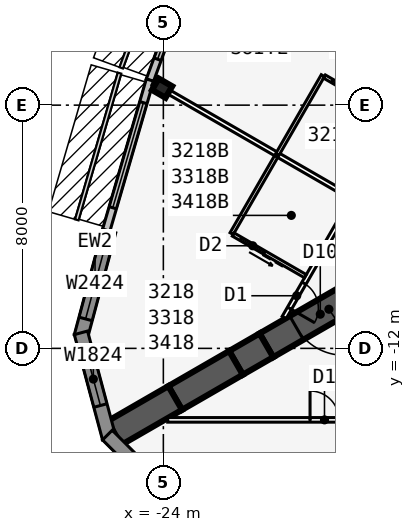
"""IFC4 building model, lengths in metres.
Left out: names, types, materials, properties, quantities, classifications, styles, units other than length and angle.
Written with IfcOpenShell. Run it as: python <this file> out.ifc"""

import sys

from ifc_helpers import new_model, si_unit, direction, frame, frame_2d, origin, origin_2d, place, context, subcontext, project, spatial, polyline, rectangle, i_section, outline, extrude, element, fill, save


model = new_model("IFC4")
c1 = context("Model", 3, precision=1e-05, world=origin(), true_north=direction((0.0, 1.0)))
c2 = subcontext(c1, "Body", "Model", "MODEL_VIEW")
j1 = project(units=[si_unit("LENGTHUNIT", "METRE"), si_unit("PLANEANGLEUNIT", "RADIAN")], contexts=[c1])
p1 = place(None, origin())
s1 = spatial("IfcSite", under=j1, at=p1, CompositionType="ELEMENT")
p2 = place(p1, origin())
s2 = spatial("IfcBuilding", under=s1, at=p2, CompositionType="ELEMENT")
p3 = place(p2, frame((0.0, 0.0, 124.9)))
s3 = spatial("IfcBuildingStorey", under=s2, at=p3, CompositionType="ELEMENT", Elevation=124.9)
p4 = place(p3, frame((-16.5, -9.526, 0.0), z_axis=(0.0, 0.0, 1.0), x_axis=(-0.866031398331, -0.499989616998, 0.0)))
e1 = element("IfcWall", 1, at=p4, inside=s3, PredefinedType="SHEAR", context=c2, shape_type="SweptSolid", body=[
    extrude(rectangle(XDim=4.746, YDim=0.9, at=frame_2d((2.373, 0.0))), origin(), (0.0, 0.0, 1.0), 3.4),
])
p5 = place(p4, frame((1.8, 0.0, 0.0)))
e2 = element("IfcOpeningElement", 2, at=p5, cuts=e1, PredefinedType="OPENING", context=c2, shape_type="SweptSolid", body=[
    extrude(rectangle(XDim=1.8, YDim=2.13, at=frame_2d((0.9, 1.065))), frame((0.0, 0.46, 0.0), z_axis=(0.0, -1.0, 0.0), x_axis=(1.0, 0.0, 0.0)), (0.0, 0.0, 1.0), 0.92),
])
p6 = place(p3, frame((-20.61, -11.899, 0.0), z_axis=(0.0, 0.0, 1.0), x_axis=(-0.866009537788, -0.500027479704, 0.0)))
e3 = element("IfcWall", 3, at=p6, inside=s3, PredefinedType="SHEAR", context=c2, shape_type="SweptSolid", body=[
    extrude(rectangle(XDim=1.155, YDim=0.9, at=frame_2d((0.577, 0.0))), origin(), (0.0, 0.0, 1.0), 3.4),
])
for number, where, z_axis, x_axis in (
    (4, (-21.61, -12.477, 0.0), (0.0, 0.0, 1.0), (-0.866, -0.5, 0.0)),
    (5, (-23.61, -13.631, 0.0), (0.0, 0.0, 1.0), (-0.866, -0.5, 0.0)),
):
    element("IfcWall", number, at=place(p3, frame(where, z_axis=z_axis, x_axis=x_axis)), inside=s3, PredefinedType="SHEAR", context=c2, shape_type="SweptSolid", body=[
        extrude(rectangle(XDim=2.309, YDim=0.9, at=frame_2d((1.155, 0.0))), origin(), (0.0, 0.0, 1.0), 3.4),
    ])
p7 = place(p3, frame((-24.041, -3.44, 0.0), z_axis=(0.0, 0.0, 1.0), x_axis=(-0.5, -0.866025403784, 0.0)))
e6 = element("IfcColumn", 6, at=p7, inside=s3, PredefinedType="COLUMN", context=c2, shape_type="SweptSolid", body=[
    extrude(i_section(OverallWidth=0.437, OverallDepth=0.513, WebThickness=0.061, FlangeThickness=0.097, at=origin_2d()), origin(), (0.0, 0.0, 1.0), 3.4),
])
p8 = place(p3, frame((-22.701, 1.584, 0.0), z_axis=(0.0, 0.0, 1.0), x_axis=(-0.343225593282, -0.939252996863, 0.0)))
e7 = element("IfcWall", 7, at=p8, inside=s3, PredefinedType="STANDARD", context=c2, shape_type="SweptSolid", body=[
    extrude(rectangle(XDim=5.076, YDim=0.25, at=frame_2d((2.538, 0.0))), origin(), (0.0, 0.0, 1.0), 3.235),
])
p9 = place(p8, frame((0.738, 0.0, 0.45)))
e8 = element("IfcOpeningElement", 8, at=p9, cuts=e7, PredefinedType="OPENING", context=c2, shape_type="SweptSolid", body=[
    extrude(rectangle(XDim=3.6, YDim=2.4, at=frame_2d((1.8, 1.2))), frame((0.0, 0.135, 0.0), z_axis=(0.0, -1.0, 0.0), x_axis=(1.0, 0.0, 0.0)), (0.0, 0.0, 1.0), 0.27),
])
p10 = place(p3, frame((-24.441, -3.175, 0.0), z_axis=(0.0, 0.0, 1.0), x_axis=(-0.279528287117, -0.960137457191, 0.0)))
e9 = element("IfcWall", 9, at=p10, inside=s3, PredefinedType="STANDARD", context=c2, shape_type="SweptSolid", body=[
    extrude(rectangle(XDim=5.148, YDim=0.25, at=frame_2d((2.574, 0.0))), origin(), (0.0, 0.0, 1.0), 3.235),
])
p11 = place(p10, frame((0.774, 0.0, 0.45)))
e10 = element("IfcOpeningElement", 10, at=p11, cuts=e9, PredefinedType="OPENING", context=c2, shape_type="SweptSolid", body=[
    extrude(rectangle(XDim=3.6, YDim=2.4, at=frame_2d((1.8, 1.2))), frame((0.0, 0.135, 0.0), z_axis=(0.0, -1.0, 0.0), x_axis=(1.0, 0.0, 0.0)), (0.0, 0.0, 1.0), 0.27),
])
p12 = place(p3, frame((-25.783, -8.141, 0.0), z_axis=(0.0, 0.0, 1.0), x_axis=(-0.258823421857, -0.965924653531, 0.0)))
e11 = element("IfcWall", 11, at=p12, inside=s3, PredefinedType="SOLIDWALL", context=c2, shape_type="SweptSolid", body=[
    extrude(rectangle(XDim=3.586, YDim=0.45, at=frame_2d((1.793, 0.0))), origin(), (0.0, 0.0, 1.0), 3.235),
])
p13 = place(p12, frame((0.593, 0.0, 0.45)))
e12 = element("IfcOpeningElement", 12, at=p13, cuts=e11, PredefinedType="OPENING", context=c2, shape_type="SweptSolid", body=[
    extrude(rectangle(XDim=2.4, YDim=2.4, at=frame_2d((1.2, 1.2))), frame((0.0, 0.235, 0.0), z_axis=(0.0, -1.0, 0.0), x_axis=(1.0, 0.0, 0.0)), (0.0, 0.0, 1.0), 0.47),
])
p14 = place(p3, frame((-26.711, -11.489, 0.0), z_axis=(0.0, 0.0, 1.0), x_axis=(0.258823421857, -0.965924653531, 0.0)))
e13 = element("IfcWall", 13, at=p14, inside=s3, PredefinedType="SOLIDWALL", context=c2, shape_type="SweptSolid", body=[
    extrude(outline(polyline([(3.586, 0.225), (3.527, 0.225), (3.035, 0.093), (3.0, 0.225), (0.0, 0.225), (0.0, -0.225), (3.586, -0.225), (3.586, 0.225)])), origin(), (0.0, 0.0, 1.0), 3.235),
])
p15 = place(p14, frame((0.675, 0.0, 0.45)))
e14 = element("IfcOpeningElement", 14, at=p15, cuts=e13, PredefinedType="OPENING", context=c2, shape_type="SweptSolid", body=[
    extrude(rectangle(XDim=1.8, YDim=2.4, at=frame_2d((0.9, 1.2))), frame((0.0, 0.235, 0.0), z_axis=(0.0, -1.0, 0.0), x_axis=(1.0, 0.0, 0.0)), (0.0, 0.0, 1.0), 0.47),
])
p16 = place(p3, frame((-25.841, -14.852, 0.0), z_axis=(0.0, 0.0, 1.0), x_axis=(0.707106781187, -0.707106781187, 0.0)))
e15 = element("IfcWall", 15, at=p16, inside=s3, PredefinedType="SOLIDWALL", context=c2, shape_type="SweptSolid", body=[
    extrude(outline(polyline([(3.586, 0.225), (0.586, 0.225), (0.551, 0.093), (0.059, 0.225), (0.0, 0.225), (0.0, -0.225), (3.586, -0.225), (3.586, 0.225)])), origin(), (0.0, 0.0, 1.0), 3.235),
])
p17 = place(p16, frame((1.111, 0.0, 0.45)))
e16 = element("IfcOpeningElement", 16, at=p17, cuts=e15, PredefinedType="OPENING", context=c2, shape_type="SweptSolid", body=[
    extrude(rectangle(XDim=1.8, YDim=2.4, at=frame_2d((0.9, 1.2))), frame((0.0, 0.235, 0.0), z_axis=(0.0, -1.0, 0.0), x_axis=(1.0, 0.0, 0.0)), (0.0, 0.0, 1.0), 0.47),
])
p18 = place(p3, frame((-23.857, -14.351, 0.0), z_axis=(0.0, 0.0, 1.0), x_axis=(1.0, 0.0, 0.0)))
e17 = element("IfcWall", 17, at=p18, inside=s3, PredefinedType="PARTITIONING", context=c2, shape_type="SweptSolid", body=[
    extrude(rectangle(XDim=47.714, YDim=0.15, at=frame_2d((23.857, 0.0))), origin(), (0.0, 0.0, 1.0), 3.235),
])
p19 = place(p18, frame((4.682, 0.0, 0.0)))
e18 = element("IfcOpeningElement", 18, at=p19, cuts=e17, PredefinedType="OPENING", context=c2, shape_type="SweptSolid", body=[
    extrude(rectangle(XDim=0.95, YDim=2.13, at=frame_2d((0.475, 1.065))), frame((0.0, 0.085, 0.0), z_axis=(0.0, -1.0, 0.0), x_axis=(1.0, 0.0, 0.0)), (0.0, 0.0, 1.0), 0.17),
])
p20 = place(p18, frame((14.682, 0.0, 0.0)))
e19 = element("IfcOpeningElement", 19, at=p20, cuts=e17, PredefinedType="OPENING", context=c2, shape_type="SweptSolid", body=[
    extrude(rectangle(XDim=0.95, YDim=2.13, at=frame_2d((0.475, 1.065))), frame((0.0, 0.085, 0.0), z_axis=(0.0, -1.0, 0.0), x_axis=(1.0, 0.0, 0.0)), (0.0, 0.0, 1.0), 0.17),
])
p21 = place(p18, frame((21.482, 0.0, 0.0)))
e20 = element("IfcOpeningElement", 20, at=p21, cuts=e17, PredefinedType="OPENING", context=c2, shape_type="SweptSolid", body=[
    extrude(rectangle(XDim=0.95, YDim=2.13, at=frame_2d((0.475, 1.065))), frame((0.0, 0.085, 0.0), z_axis=(0.0, -1.0, 0.0), x_axis=(1.0, 0.0, 0.0)), (0.0, 0.0, 1.0), 0.17),
])
p22 = place(p18, frame((25.857, 0.0, 0.0)))
e21 = element("IfcOpeningElement", 21, at=p22, cuts=e17, PredefinedType="OPENING", context=c2, shape_type="SweptSolid", body=[
    extrude(rectangle(XDim=1.0, YDim=2.13, at=frame_2d((0.5, 1.065))), frame((0.0, 0.085, 0.0), z_axis=(0.0, -1.0, 0.0), x_axis=(1.0, 0.0, 0.0)), (0.0, 0.0, 1.0), 0.17),
])
p23 = place(p18, frame((30.282, 0.0, 0.0)))
e22 = element("IfcOpeningElement", 22, at=p23, cuts=e17, PredefinedType="OPENING", context=c2, shape_type="SweptSolid", body=[
    extrude(rectangle(XDim=0.95, YDim=2.13, at=frame_2d((0.475, 1.065))), frame((0.0, 0.085, 0.0), z_axis=(0.0, -1.0, 0.0), x_axis=(1.0, 0.0, 0.0)), (0.0, 0.0, 1.0), 0.17),
])
p24 = place(p18, frame((43.041, 0.0, 0.0)))
e23 = element("IfcOpeningElement", 23, at=p24, cuts=e17, PredefinedType="OPENING", context=c2, shape_type="SweptSolid", body=[
    extrude(rectangle(XDim=0.95, YDim=2.13, at=frame_2d((0.475, 1.065))), frame((0.0, 0.085, 0.0), z_axis=(0.0, -1.0, 0.0), x_axis=(1.0, 0.0, 0.0)), (0.0, 0.0, 1.0), 0.17),
])
p25 = place(p3, frame((-0.5, 22.836, 0.0), z_axis=(0.0, 0.0, 1.0), x_axis=(-0.500001677587, -0.866024435227, 0.0)))
e24 = element("IfcWall", 24, at=p25, inside=s3, PredefinedType="PARTITIONING", context=c2, shape_type="SweptSolid", body=[
    extrude(rectangle(XDim=39.054, YDim=0.15, at=frame_2d((19.527, 0.0))), origin(), (0.0, 0.0, 1.0), 3.235),
])
p26 = place(p25, frame((0.352, 0.0, 0.0)))
e25 = element("IfcOpeningElement", 25, at=p26, cuts=e24, PredefinedType="OPENING", context=c2, shape_type="SweptSolid", body=[
    extrude(rectangle(XDim=0.95, YDim=2.13, at=frame_2d((0.475, 1.065))), frame((0.0, 0.085, 0.0), z_axis=(0.0, -1.0, 0.0), x_axis=(1.0, 0.0, 0.0)), (0.0, 0.0, 1.0), 0.17),
])
p27 = place(p25, frame((5.952, 0.0, 0.0)))
e26 = element("IfcOpeningElement", 26, at=p27, cuts=e24, PredefinedType="OPENING", context=c2, shape_type="SweptSolid", body=[
    extrude(rectangle(XDim=0.95, YDim=2.13, at=frame_2d((0.475, 1.065))), frame((0.0, 0.085, 0.0), z_axis=(0.0, -1.0, 0.0), x_axis=(1.0, 0.0, 0.0)), (0.0, 0.0, 1.0), 0.17),
])
p28 = place(p25, frame((12.152, 0.0, 0.0)))
e27 = element("IfcOpeningElement", 27, at=p28, cuts=e24, PredefinedType="OPENING", context=c2, shape_type="SweptSolid", body=[
    extrude(rectangle(XDim=0.95, YDim=2.13, at=frame_2d((0.475, 1.065))), frame((0.0, 0.085, 0.0), z_axis=(0.0, -1.0, 0.0), x_axis=(1.0, 0.0, 0.0)), (0.0, 0.0, 1.0), 0.17),
])
p29 = place(p25, frame((15.352, 0.0, 0.0)))
e28 = element("IfcOpeningElement", 28, at=p29, cuts=e24, PredefinedType="OPENING", context=c2, shape_type="SweptSolid", body=[
    extrude(rectangle(XDim=0.95, YDim=2.13, at=frame_2d((0.475, 1.065))), frame((0.0, 0.085, 0.0), z_axis=(0.0, -1.0, 0.0), x_axis=(1.0, 0.0, 0.0)), (0.0, 0.0, 1.0), 0.17),
])
p30 = place(p25, frame((22.152, 0.0, 0.0)))
e29 = element("IfcOpeningElement", 29, at=p30, cuts=e24, PredefinedType="OPENING", context=c2, shape_type="SweptSolid", body=[
    extrude(rectangle(XDim=0.95, YDim=2.13, at=frame_2d((0.475, 1.065))), frame((0.0, 0.085, 0.0), z_axis=(0.0, -1.0, 0.0), x_axis=(1.0, 0.0, 0.0)), (0.0, 0.0, 1.0), 0.17),
])
p31 = place(p25, frame((30.352, 0.0, 0.0)))
e30 = element("IfcOpeningElement", 30, at=p31, cuts=e24, PredefinedType="OPENING", context=c2, shape_type="SweptSolid", body=[
    extrude(rectangle(XDim=0.95, YDim=2.13, at=frame_2d((0.475, 1.065))), frame((0.0, 0.085, 0.0), z_axis=(0.0, -1.0, 0.0), x_axis=(1.0, 0.0, 0.0)), (0.0, 0.0, 1.0), 0.17),
])
p32 = place(p25, frame((37.752, 0.0, 0.0)))
e31 = element("IfcOpeningElement", 31, at=p32, cuts=e24, PredefinedType="OPENING", context=c2, shape_type="SweptSolid", body=[
    extrude(rectangle(XDim=0.95, YDim=2.13, at=frame_2d((0.475, 1.065))), frame((0.0, 0.085, 0.0), z_axis=(0.0, -1.0, 0.0), x_axis=(1.0, 0.0, 0.0)), (0.0, 0.0, 1.0), 0.17),
])
p33 = place(p3, frame((-17.829, -7.027, 0.0), z_axis=(0.0, 0.0, 1.0), x_axis=(-0.866029804378, 0.499992377871, 0.0)))
e32 = element("IfcWall", 32, at=p33, inside=s3, PredefinedType="PARTITIONING", context=c2, shape_type="SweptSolid", body=[
    extrude(rectangle(XDim=7.516, YDim=0.15, at=frame_2d((3.758, 0.0))), origin(), (0.0, 0.0, 1.0), 2.389),
])
p34 = place(p3, frame((-18.753, -3.029, 0.0), z_axis=(0.0, 0.0, 1.0), x_axis=(-0.50002537861, -0.866010750942, 0.0)))
e33 = element("IfcWall", 33, at=p34, inside=s3, PredefinedType="PLUMBINGWALL", context=c2, shape_type="SweptSolid", body=[
    extrude(rectangle(XDim=3.0, YDim=0.12, at=frame_2d((1.5, 0.0))), origin(), (0.0, 0.0, 1.0), 3.235),
])
p35 = place(p3, frame((-16.329, -4.429, 0.0), z_axis=(0.0, 0.0, 1.0), x_axis=(-0.865997131366, 0.500048966069, 0.0)))
e34 = element("IfcWall", 34, at=p35, inside=s3, PredefinedType="PLUMBINGWALL", context=c2, shape_type="SweptSolid", body=[
    extrude(rectangle(XDim=2.74, YDim=0.12, at=frame_2d((1.37, 0.0))), origin(), (0.0, 0.0, 1.0), 3.235),
])
p36 = place(p35, frame((1.55, 0.0, 0.0)))
e35 = element("IfcOpeningElement", 35, at=p36, cuts=e34, PredefinedType="OPENING", context=c2, shape_type="SweptSolid", body=[
    extrude(rectangle(XDim=0.9, YDim=2.13, at=frame_2d((0.45, 1.065))), frame((0.0, 0.07, 0.0), z_axis=(0.0, -1.0, 0.0), x_axis=(1.0, 0.0, 0.0)), (0.0, 0.0, 1.0), 0.14),
])
p37 = place(p3, frame((-20.253, -5.627, 0.0), z_axis=(0.0, 0.0, 1.0), x_axis=(-0.499990139034, -0.866031096941, 0.0)))
e36 = element("IfcWall", 36, at=p37, inside=s3, PredefinedType="PLUMBINGWALL", context=c2, shape_type="SweptSolid", body=[
    extrude(rectangle(XDim=3.0, YDim=0.12, at=frame_2d((1.5, 0.0))), origin(), (0.0, 0.0, 1.0), 3.235),
])
p38 = place(p3, frame((-19.329, -9.625, 0.0), z_axis=(0.0, 0.0, 1.0), x_axis=(-0.866035715982, 0.499982138324, 0.0)))
e37 = element("IfcWall", 37, at=p38, inside=s3, PredefinedType="PLUMBINGWALL", context=c2, shape_type="SweptSolid", body=[
    extrude(rectangle(XDim=2.74, YDim=0.12, at=frame_2d((1.37, 0.0))), origin(), (0.0, 0.0, 1.0), 3.235),
])
p39 = place(p38, frame((1.55, 0.0, 0.0)))
e38 = element("IfcOpeningElement", 38, at=p39, cuts=e37, PredefinedType="OPENING", context=c2, shape_type="SweptSolid", body=[
    extrude(rectangle(XDim=0.9, YDim=2.13, at=frame_2d((0.45, 1.065))), frame((0.0, 0.07, 0.0), z_axis=(0.0, -1.0, 0.0), x_axis=(1.0, 0.0, 0.0)), (0.0, 0.0, 1.0), 0.14),
])
p40 = place(p9, origin())
e39 = element("IfcWindow", 39, at=p40, inside=s3, PartitioningType="SINGLE_PANEL", PredefinedType="WINDOW", context=c2, shape_type="SweptSolid", body=[
    extrude(rectangle(XDim=3.6, YDim=2.4, at=frame_2d((1.8, 1.2))), frame((0.0, 0.03, 0.0), z_axis=(0.0, -1.0, 0.0), x_axis=(1.0, 0.0, 0.0)), (0.0, 0.0, 1.0), 0.06),
])
fill(e8, e39)
p41 = place(p11, origin())
e40 = element("IfcWindow", 40, at=p41, inside=s3, PartitioningType="SINGLE_PANEL", PredefinedType="WINDOW", context=c2, shape_type="SweptSolid", body=[
    extrude(rectangle(XDim=3.6, YDim=2.4, at=frame_2d((1.8, 1.2))), frame((0.0, 0.03, 0.0), z_axis=(0.0, -1.0, 0.0), x_axis=(1.0, 0.0, 0.0)), (0.0, 0.0, 1.0), 0.06),
])
fill(e10, e40)
p42 = place(p13, origin())
e41 = element("IfcWindow", 41, at=p42, inside=s3, PartitioningType="SINGLE_PANEL", PredefinedType="WINDOW", context=c2, shape_type="SweptSolid", body=[
    extrude(rectangle(XDim=2.4, YDim=2.4, at=frame_2d((1.2, 1.2))), frame((0.0, 0.03, 0.0), z_axis=(0.0, -1.0, 0.0), x_axis=(1.0, 0.0, 0.0)), (0.0, 0.0, 1.0), 0.06),
])
fill(e12, e41)
p43 = place(p15, origin())
e42 = element("IfcWindow", 42, at=p43, inside=s3, PartitioningType="SINGLE_PANEL", PredefinedType="WINDOW", context=c2, shape_type="SweptSolid", body=[
    extrude(rectangle(XDim=1.8, YDim=2.4, at=frame_2d((0.9, 1.2))), frame((0.0, 0.03, 0.0), z_axis=(0.0, -1.0, 0.0), x_axis=(1.0, 0.0, 0.0)), (0.0, 0.0, 1.0), 0.06),
])
fill(e14, e42)
p44 = place(p19, origin())
e43 = element("IfcDoor", 43, at=p44, inside=s3, OperationType="SINGLE_SWING_LEFT", PredefinedType="DOOR", context=c2, shape_type="SweptSolid", body=[
    extrude(rectangle(XDim=0.95, YDim=2.13, at=frame_2d((0.475, 1.065))), frame((0.0, 0.025, 0.0), z_axis=(0.0, -1.0, 0.0), x_axis=(1.0, 0.0, 0.0)), (0.0, 0.0, 1.0), 0.05),
])
fill(e18, e43)
p45 = place(p36, origin())
e44 = element("IfcDoor", 44, at=p45, inside=s3, OperationType="SLIDING_TO_LEFT", PredefinedType="DOOR", context=c2, shape_type="SweptSolid", body=[
    extrude(rectangle(XDim=0.9, YDim=2.13, at=frame_2d((0.45, 1.065))), frame((0.0, 0.025, 0.0), z_axis=(0.0, -1.0, 0.0), x_axis=(1.0, 0.0, 0.0)), (0.0, 0.0, 1.0), 0.05),
])
fill(e35, e44)
p46 = place(p39, origin())
e45 = element("IfcDoor", 45, at=p46, inside=s3, OperationType="SLIDING_TO_LEFT", PredefinedType="DOOR", context=c2, shape_type="SweptSolid", body=[
    extrude(rectangle(XDim=0.9, YDim=2.13, at=frame_2d((0.45, 1.065))), frame((0.0, 0.025, 0.0), z_axis=(0.0, -1.0, 0.0), x_axis=(1.0, 0.0, 0.0)), (0.0, 0.0, 1.0), 0.05),
])
fill(e38, e45)
p47 = place(p32, origin())
e46 = element("IfcDoor", 46, at=p47, inside=s3, OperationType="SINGLE_SWING_RIGHT", PredefinedType="DOOR", context=c2, shape_type="SweptSolid", body=[
    extrude(rectangle(XDim=0.95, YDim=2.13, at=frame_2d((0.475, 1.065))), frame((0.0, 0.025, 0.0), z_axis=(0.0, -1.0, 0.0), x_axis=(1.0, 0.0, 0.0)), (0.0, 0.0, 1.0), 0.05),
])
fill(e31, e46)
p48 = place(p5, origin())
e47 = element("IfcDoor", 47, at=p48, inside=s3, OperationType="DOUBLE_DOOR_DOUBLE_SWING", PredefinedType="DOOR", context=c2, shape_type="SweptSolid", body=[
    extrude(rectangle(XDim=1.8, YDim=2.13, at=frame_2d((0.9, 1.065))), frame((0.0, 0.025, 0.0), z_axis=(0.0, -1.0, 0.0), x_axis=(1.0, 0.0, 0.0)), (0.0, 0.0, 1.0), 0.05),
])
fill(e2, e47)
save(model, sys.argv[1])
